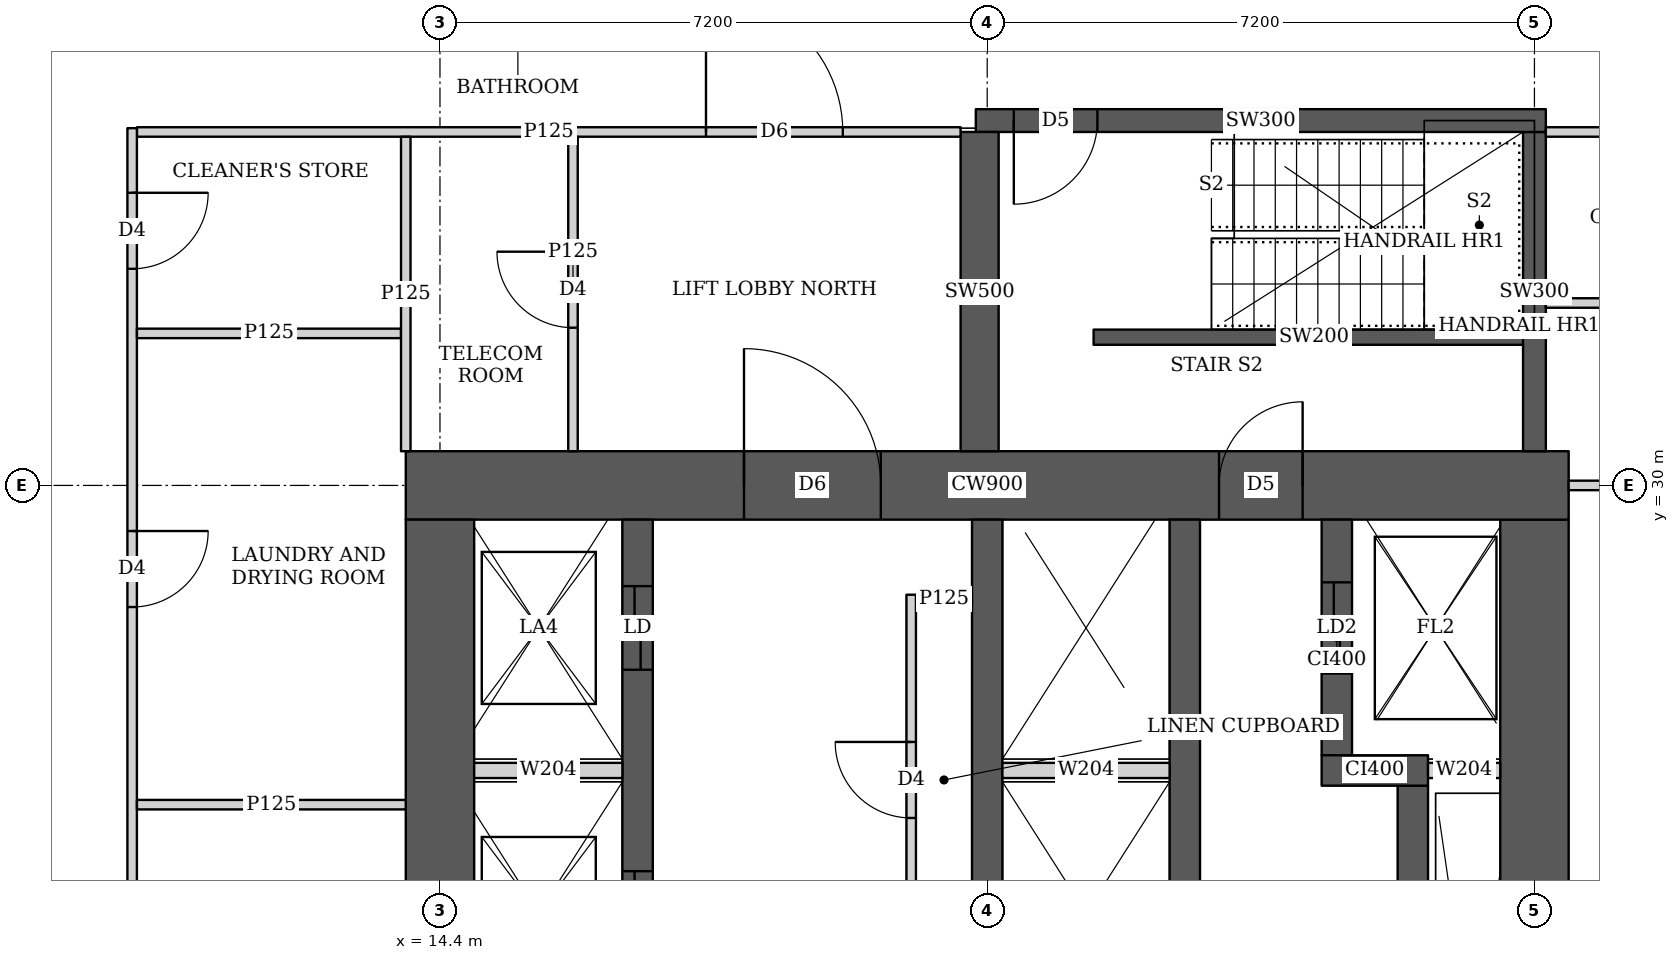
"""IFC4 building model, lengths in metres.
Left out: names, types, materials, properties, quantities, classifications, styles, units other than length and angle.
Written with IfcOpenShell. Run it as: python <this file> out.ifc"""

import sys

from ifc_helpers import new_model, si_unit, direction, frame, frame_2d, origin, place, context, subcontext, project, spatial, rectangle, extrude, element, fill, save


model = new_model("IFC4")
c1 = context("Model", 3, precision=1e-05, world=origin(), true_north=direction((0.0, 1.0)))
c2 = subcontext(c1, "Body", "Model", "MODEL_VIEW")
j1 = project(units=[si_unit("LENGTHUNIT", "METRE"), si_unit("PLANEANGLEUNIT", "RADIAN")], contexts=[c1])
p1 = place(None, origin())
s1 = spatial("IfcSite", under=j1, at=p1, CompositionType="ELEMENT")
p2 = place(p1, origin())
s2 = spatial("IfcBuilding", under=s1, at=p2, CompositionType="ELEMENT")
p3 = place(p2, frame((0.0, 0.0, 111.65)))
s3 = spatial("IfcBuildingStorey", under=s2, at=p3, CompositionType="ELEMENT", Elevation=111.65)
p4 = place(p3, frame((13.95, 30.0, 0.0), z_axis=(0.0, 0.0, 1.0), x_axis=(1.0, 0.0, 0.0)))
e1 = element("IfcWall", 1, at=p4, inside=s3, PredefinedType="SHEAR", context=c2, shape_type="SweptSolid", body=[
    extrude(rectangle(XDim=15.3, YDim=0.9, at=frame_2d((7.65, 0.0))), origin(), (0.0, 0.0, 1.0), 3.75),
])
p5 = place(p4, frame((4.45, 0.0, 0.0)))
e2 = element("IfcOpeningElement", 2, at=p5, cuts=e1, PredefinedType="OPENING", context=c2, shape_type="SweptSolid", body=[
    extrude(rectangle(XDim=1.8, YDim=2.1, at=frame_2d((0.9, 1.05))), frame((0.0, 0.46, 0.0), z_axis=(0.0, -1.0, 0.0), x_axis=(1.0, 0.0, 0.0)), (0.0, 0.0, 1.0), 0.92),
])
p6 = place(p4, frame((10.7, 0.0, 0.0)))
e3 = element("IfcOpeningElement", 3, at=p6, cuts=e1, PredefinedType="OPENING", context=c2, shape_type="SweptSolid", body=[
    extrude(rectangle(XDim=1.1, YDim=2.1, at=frame_2d((0.55, 1.05))), frame((0.0, 0.46, 0.0), z_axis=(0.0, -1.0, 0.0), x_axis=(1.0, 0.0, 0.0)), (0.0, 0.0, 1.0), 0.92),
])
for number, where, z_axis, x_axis in (
    (4, (14.4, 15.45, 0.0), (0.0, 0.0, 1.0), (0.0, 1.0, 0.0)),
    (5, (28.8, 15.45, 0.0), (0.0, 0.0, 1.0), (0.0, 1.0, 0.0)),
):
    element("IfcWall", number, at=place(p3, frame(where, z_axis=z_axis, x_axis=x_axis)), inside=s3, PredefinedType="SHEAR", context=c2, shape_type="SweptSolid", body=[
        extrude(rectangle(XDim=14.1, YDim=0.9, at=frame_2d((7.05, 0.0))), origin(), (0.0, 0.0, 1.0), 3.75),
    ])
p7 = place(p3, frame((17.0, 15.45, 0.0), z_axis=(0.0, 0.0, 1.0), x_axis=(0.0, 1.0, 0.0)))
e6 = element("IfcWall", 6, at=p7, inside=s3, PredefinedType="SHEAR", context=c2, shape_type="SweptSolid", body=[
    extrude(rectangle(XDim=14.1, YDim=0.4, at=frame_2d((7.05, 0.0))), origin(), (0.0, 0.0, 1.0), 3.75),
])
p8 = place(p7, frame((0.875, 0.0, 0.0)))
e7 = element("IfcOpeningElement", 7, at=p8, cuts=e6, PredefinedType="OPENING", context=c2, shape_type="SweptSolid", body=[
    extrude(rectangle(XDim=1.1, YDim=2.1, at=frame_2d((0.55, 1.05))), frame((0.0, 0.21, 0.0), z_axis=(0.0, -1.0, 0.0), x_axis=(1.0, 0.0, 0.0)), (0.0, 0.0, 1.0), 0.42),
])
p9 = place(p7, frame((4.625, 0.0, 0.0)))
e8 = element("IfcOpeningElement", 8, at=p9, cuts=e6, PredefinedType="OPENING", context=c2, shape_type="SweptSolid", body=[
    extrude(rectangle(XDim=1.1, YDim=2.1, at=frame_2d((0.55, 1.05))), frame((0.0, 0.21, 0.0), z_axis=(0.0, -1.0, 0.0), x_axis=(1.0, 0.0, 0.0)), (0.0, 0.0, 1.0), 0.42),
])
p10 = place(p7, frame((8.375, 0.0, 0.0)))
e9 = element("IfcOpeningElement", 9, at=p10, cuts=e6, PredefinedType="OPENING", context=c2, shape_type="SweptSolid", body=[
    extrude(rectangle(XDim=1.1, YDim=2.1, at=frame_2d((0.55, 1.05))), frame((0.0, 0.21, 0.0), z_axis=(0.0, -1.0, 0.0), x_axis=(1.0, 0.0, 0.0)), (0.0, 0.0, 1.0), 0.42),
])
p11 = place(p7, frame((12.125, 0.0, 0.0)))
e10 = element("IfcOpeningElement", 10, at=p11, cuts=e6, PredefinedType="OPENING", context=c2, shape_type="SweptSolid", body=[
    extrude(rectangle(XDim=1.1, YDim=2.1, at=frame_2d((0.55, 1.05))), frame((0.0, 0.21, 0.0), z_axis=(0.0, -1.0, 0.0), x_axis=(1.0, 0.0, 0.0)), (0.0, 0.0, 1.0), 0.42),
])
for number, where, z_axis, x_axis in (
    (11, (21.6, 15.45, 0.0), (0.0, 0.0, 1.0), (0.0, 1.0, 0.0)),
    (12, (24.2, 15.45, 0.0), (0.0, 0.0, 1.0), (0.0, 1.0, 0.0)),
):
    element("IfcWall", number, at=place(p3, frame(where, z_axis=z_axis, x_axis=x_axis)), inside=s3, PredefinedType="SHEAR", context=c2, shape_type="SweptSolid", body=[
        extrude(rectangle(XDim=14.1, YDim=0.4, at=frame_2d((7.05, 0.0))), origin(), (0.0, 0.0, 1.0), 3.75),
    ])
p12 = place(p3, frame((27.2, 18.95, 0.0), z_axis=(0.0, 0.0, 1.0), x_axis=(0.0, 1.0, 0.0)))
e13 = element("IfcWall", 13, at=p12, inside=s3, PredefinedType="SHEAR", context=c2, shape_type="SweptSolid", body=[
    extrude(rectangle(XDim=7.1, YDim=0.4, at=frame_2d((3.55, 0.0))), origin(), (0.0, 0.0, 1.0), 3.75),
])
p13 = place(p3, frame((26.0, 26.25, 0.0), z_axis=(0.0, 0.0, 1.0), x_axis=(1.0, 0.0, 0.0)))
e14 = element("IfcWall", 14, at=p13, inside=s3, PredefinedType="SHEAR", context=c2, shape_type="SweptSolid", body=[
    extrude(rectangle(XDim=1.4, YDim=0.4, at=frame_2d((0.7, 0.0))), origin(), (0.0, 0.0, 1.0), 3.75),
])
p14 = place(p3, frame((26.2, 26.45, 0.0), z_axis=(0.0, 0.0, 1.0), x_axis=(0.0, 1.0, 0.0)))
e15 = element("IfcWall", 15, at=p14, inside=s3, PredefinedType="SHEAR", context=c2, shape_type="SweptSolid", body=[
    extrude(rectangle(XDim=3.1, YDim=0.4, at=frame_2d((1.55, 0.0))), origin(), (0.0, 0.0, 1.0), 3.75),
])
p15 = place(p14, frame((1.075, 0.0, 0.0)))
e16 = element("IfcOpeningElement", 16, at=p15, cuts=e15, PredefinedType="OPENING", context=c2, shape_type="SweptSolid", body=[
    extrude(rectangle(XDim=1.2, YDim=2.1, at=frame_2d((0.6, 1.05))), frame((0.0, 0.21, 0.0), z_axis=(0.0, -1.0, 0.0), x_axis=(1.0, 0.0, 0.0)), (0.0, 0.0, 1.0), 0.42),
])
p16 = place(p3, frame((21.45, 34.8, 0.0), z_axis=(0.0, 0.0, 1.0), x_axis=(1.0, 0.0, 0.0)))
e17 = element("IfcWall", 17, at=p16, inside=s3, PredefinedType="SHEAR", context=c2, shape_type="SweptSolid", body=[
    extrude(rectangle(XDim=7.5, YDim=0.3, at=frame_2d((3.75, 0.0))), origin(), (0.0, 0.0, 1.0), 3.75),
])
p17 = place(p16, frame((0.5, 0.0, 0.0)))
e18 = element("IfcOpeningElement", 18, at=p17, cuts=e17, PredefinedType="OPENING", context=c2, shape_type="SweptSolid", body=[
    extrude(rectangle(XDim=1.1, YDim=2.1, at=frame_2d((0.55, 1.05))), frame((0.0, 0.16, 0.0), z_axis=(0.0, -1.0, 0.0), x_axis=(1.0, 0.0, 0.0)), (0.0, 0.0, 1.0), 0.32),
])
p18 = place(p3, frame((21.5, 30.45, 0.0), z_axis=(0.0, 0.0, 1.0), x_axis=(0.0, 1.0, 0.0)))
e19 = element("IfcWall", 19, at=p18, inside=s3, PredefinedType="SHEAR", context=c2, shape_type="SweptSolid", body=[
    extrude(rectangle(XDim=4.2, YDim=0.5, at=frame_2d((2.1, 0.0))), origin(), (0.0, 0.0, 1.0), 3.75),
])
p19 = place(p3, frame((28.8, 30.45, 0.0), z_axis=(0.0, 0.0, 1.0), x_axis=(0.0, 1.0, 0.0)))
e20 = element("IfcWall", 20, at=p19, inside=s3, PredefinedType="SHEAR", context=c2, shape_type="SweptSolid", body=[
    extrude(rectangle(XDim=4.2, YDim=0.3, at=frame_2d((2.1, 0.0))), origin(), (0.0, 0.0, 1.0), 3.75),
])
p20 = place(p3, frame((10.35, 10.3, 0.0), z_axis=(0.0, 0.0, 1.0), x_axis=(0.0, 1.0, 0.0)))
e21 = element("IfcWall", 21, at=p20, inside=s3, PredefinedType="PARTITIONING", context=c2, shape_type="SweptSolid", body=[
    extrude(rectangle(XDim=24.4, YDim=0.125, at=frame_2d((12.2, 0.0))), origin(), (0.0, 0.0, 1.0), 3.5),
])
p21 = place(p20, frame((1.55, 0.0, 0.0)))
e22 = element("IfcOpeningElement", 22, at=p21, cuts=e21, PredefinedType="OPENING", context=c2, shape_type="SweptSolid", body=[
    extrude(rectangle(XDim=1.0, YDim=2.1, at=frame_2d((0.5, 1.05))), frame((0.0, 0.073, 0.0), z_axis=(0.0, -1.0, 0.0), x_axis=(1.0, 0.0, 0.0)), (0.0, 0.0, 1.0), 0.145),
])
p22 = place(p20, frame((5.1, 0.0, 0.0)))
e23 = element("IfcOpeningElement", 23, at=p22, cuts=e21, PredefinedType="OPENING", context=c2, shape_type="SweptSolid", body=[
    extrude(rectangle(XDim=1.0, YDim=2.1, at=frame_2d((0.5, 1.05))), frame((0.0, 0.073, 0.0), z_axis=(0.0, -1.0, 0.0), x_axis=(1.0, 0.0, 0.0)), (0.0, 0.0, 1.0), 0.145),
])
p23 = place(p20, frame((10.8, 0.0, 0.0)))
e24 = element("IfcOpeningElement", 24, at=p23, cuts=e21, PredefinedType="OPENING", context=c2, shape_type="SweptSolid", body=[
    extrude(rectangle(XDim=1.0, YDim=2.1, at=frame_2d((0.5, 1.05))), frame((0.0, 0.073, 0.0), z_axis=(0.0, -1.0, 0.0), x_axis=(1.0, 0.0, 0.0)), (0.0, 0.0, 1.0), 0.145),
])
p24 = place(p20, frame((18.1, 0.0, 0.0)))
e25 = element("IfcOpeningElement", 25, at=p24, cuts=e21, PredefinedType="OPENING", context=c2, shape_type="SweptSolid", body=[
    extrude(rectangle(XDim=1.0, YDim=2.1, at=frame_2d((0.5, 1.05))), frame((0.0, 0.073, 0.0), z_axis=(0.0, -1.0, 0.0), x_axis=(1.0, 0.0, 0.0)), (0.0, 0.0, 1.0), 0.145),
])
p25 = place(p20, frame((22.55, 0.0, 0.0)))
e26 = element("IfcOpeningElement", 26, at=p25, cuts=e21, PredefinedType="OPENING", context=c2, shape_type="SweptSolid", body=[
    extrude(rectangle(XDim=1.0, YDim=2.1, at=frame_2d((0.5, 1.05))), frame((0.0, 0.073, 0.0), z_axis=(0.0, -1.0, 0.0), x_axis=(1.0, 0.0, 0.0)), (0.0, 0.0, 1.0), 0.145),
])
p26 = place(p3, frame((10.413, 25.8, 0.0), z_axis=(0.0, 0.0, 1.0), x_axis=(1.0, 0.0, 0.0)))
e27 = element("IfcWall", 27, at=p26, inside=s3, PredefinedType="PARTITIONING", context=c2, shape_type="SweptSolid", body=[
    extrude(rectangle(XDim=3.537, YDim=0.125, at=frame_2d((1.769, 0.0))), origin(), (0.0, 0.0, 1.0), 3.5),
])
p27 = place(p3, frame((10.413, 32.0, 0.0), z_axis=(0.0, 0.0, 1.0), x_axis=(1.0, 0.0, 0.0)))
e28 = element("IfcWall", 28, at=p27, inside=s3, PredefinedType="PARTITIONING", context=c2, shape_type="SweptSolid", body=[
    extrude(rectangle(XDim=3.475, YDim=0.125, at=frame_2d((1.737, 0.0))), origin(), (0.0, 0.0, 1.0), 3.5),
])
p28 = place(p3, frame((13.95, 30.45, 0.0), z_axis=(0.0, 0.0, 1.0), x_axis=(0.0, 1.0, 0.0)))
e29 = element("IfcWall", 29, at=p28, inside=s3, PredefinedType="PARTITIONING", context=c2, shape_type="SweptSolid", body=[
    extrude(rectangle(XDim=4.137, YDim=0.125, at=frame_2d((2.068, 0.0))), origin(), (0.0, 0.0, 1.0), 3.5),
])
p29 = place(p3, frame((10.413, 34.65, 0.0), z_axis=(0.0, 0.0, 1.0), x_axis=(1.0, 0.0, 0.0)))
e30 = element("IfcWall", 30, at=p29, inside=s3, PredefinedType="PARTITIONING", context=c2, shape_type="SweptSolid", body=[
    extrude(rectangle(XDim=10.837, YDim=0.125, at=frame_2d((5.418, 0.0))), origin(), (0.0, 0.0, 1.0), 3.5),
])
p30 = place(p29, frame((7.487, 0.0, 0.0)))
e31 = element("IfcOpeningElement", 31, at=p30, cuts=e30, PredefinedType="OPENING", context=c2, shape_type="SweptSolid", body=[
    extrude(rectangle(XDim=1.8, YDim=2.1, at=frame_2d((0.9, 1.05))), frame((0.0, 0.073, 0.0), z_axis=(0.0, -1.0, 0.0), x_axis=(1.0, 0.0, 0.0)), (0.0, 0.0, 1.0), 0.145),
])
p31 = place(p3, frame((16.15, 30.45, 0.0), z_axis=(0.0, 0.0, 1.0), x_axis=(0.0, 1.0, 0.0)))
e32 = element("IfcWall", 32, at=p31, inside=s3, PredefinedType="PARTITIONING", context=c2, shape_type="SweptSolid", body=[
    extrude(rectangle(XDim=4.137, YDim=0.125, at=frame_2d((2.068, 0.0))), origin(), (0.0, 0.0, 1.0), 3.5),
])
p32 = place(p31, frame((1.625, 0.0, 0.0)))
e33 = element("IfcOpeningElement", 33, at=p32, cuts=e32, PredefinedType="OPENING", context=c2, shape_type="SweptSolid", body=[
    extrude(rectangle(XDim=1.0, YDim=2.1, at=frame_2d((0.5, 1.05))), frame((0.0, 0.073, 0.0), z_axis=(0.0, -1.0, 0.0), x_axis=(1.0, 0.0, 0.0)), (0.0, 0.0, 1.0), 0.145),
])
p33 = place(p3, frame((28.95, 34.65, 0.0), z_axis=(0.0, 0.0, 1.0), x_axis=(1.0, 0.0, 0.0)))
e34 = element("IfcWall", 34, at=p33, inside=s3, PredefinedType="PARTITIONING", context=c2, shape_type="SweptSolid", body=[
    extrude(rectangle(XDim=4.381, YDim=0.125, at=frame_2d((2.19, 0.0))), origin(), (0.0, 0.0, 1.0), 3.5),
])
p34 = place(p3, frame((29.25, 30.0, 0.0), z_axis=(0.0, 0.0, 1.0), x_axis=(1.0, 0.0, 0.0)))
e35 = element("IfcWall", 35, at=p34, inside=s3, PredefinedType="PARTITIONING", context=c2, shape_type="SweptSolid", body=[
    extrude(rectangle(XDim=2.949, YDim=0.125, at=frame_2d((1.475, 0.0))), origin(), (0.0, 0.0, 1.0), 3.5),
])
p35 = place(p3, frame((28.95, 32.4, 0.0), z_axis=(0.0, 0.0, 1.0), x_axis=(1.0, 0.0, 0.0)))
e36 = element("IfcWall", 36, at=p35, inside=s3, PredefinedType="PARTITIONING", context=c2, shape_type="SweptSolid", body=[
    extrude(rectangle(XDim=4.722, YDim=0.125, at=frame_2d((2.361, 0.0))), origin(), (0.0, 0.0, 1.0), 3.5),
])
p36 = place(p3, frame((20.6, 19.938, 0.0), z_axis=(0.0, 0.0, 1.0), x_axis=(0.0, 1.0, 0.0)))
e37 = element("IfcWall", 37, at=p36, inside=s3, PredefinedType="PARTITIONING", context=c2, shape_type="SweptSolid", body=[
    extrude(rectangle(XDim=8.624, YDim=0.125, at=frame_2d((4.312, 0.0))), origin(), (0.0, 0.0, 1.0), 3.5),
])
p37 = place(p36, frame((1.437, 0.0, 0.0)))
e38 = element("IfcOpeningElement", 38, at=p37, cuts=e37, PredefinedType="OPENING", context=c2, shape_type="SweptSolid", body=[
    extrude(rectangle(XDim=1.0, YDim=2.1, at=frame_2d((0.5, 1.05))), frame((0.0, 0.073, 0.0), z_axis=(0.0, -1.0, 0.0), x_axis=(1.0, 0.0, 0.0)), (0.0, 0.0, 1.0), 0.145),
])
p38 = place(p36, frame((5.687, 0.0, 0.0)))
e39 = element("IfcOpeningElement", 39, at=p38, cuts=e37, PredefinedType="OPENING", context=c2, shape_type="SweptSolid", body=[
    extrude(rectangle(XDim=1.0, YDim=2.1, at=frame_2d((0.5, 1.05))), frame((0.0, 0.073, 0.0), z_axis=(0.0, -1.0, 0.0), x_axis=(1.0, 0.0, 0.0)), (0.0, 0.0, 1.0), 0.145),
])
p39 = place(p3, frame((20.663, 28.5, 0.0), z_axis=(0.0, 0.0, 1.0), x_axis=(1.0, 0.0, 0.0)))
e40 = element("IfcWall", 40, at=p39, inside=s3, PredefinedType="PARTITIONING", context=c2, shape_type="SweptSolid", body=[
    extrude(rectangle(XDim=0.737, YDim=0.125, at=frame_2d((0.368, 0.0))), origin(), (0.0, 0.0, 1.0), 3.5),
])
p40 = place(p3, frame((23.0, 31.95, 0.0), z_axis=(0.0, 0.0, 1.0), x_axis=(1.0, 0.0, 0.0)))
e41 = element("IfcWall", 41, at=p40, inside=s3, PredefinedType="SHEAR", context=c2, shape_type="SweptSolid", body=[
    extrude(rectangle(XDim=5.8, YDim=0.2, at=frame_2d((2.9, 0.0))), origin(), (0.0, 0.0, 1.0), 3.75),
])
p41 = place(p3, frame((14.85, 26.25, 0.0), z_axis=(0.0, 0.0, 1.0), x_axis=(1.0, 0.0, 0.0)))
e42 = element("IfcWall", 42, at=p41, inside=s3, PredefinedType="SOLIDWALL", context=c2, shape_type="SweptSolid", body=[
    extrude(rectangle(XDim=1.95, YDim=0.2, at=frame_2d((0.975, 0.0))), origin(), (0.0, 0.0, 1.0), 3.5),
])
p42 = place(p3, frame((21.8, 26.25, 0.0), z_axis=(0.0, 0.0, 1.0), x_axis=(1.0, 0.0, 0.0)))
e43 = element("IfcWall", 43, at=p42, inside=s3, PredefinedType="SOLIDWALL", context=c2, shape_type="SweptSolid", body=[
    extrude(rectangle(XDim=2.2, YDim=0.2, at=frame_2d((1.1, 0.0))), origin(), (0.0, 0.0, 1.0), 3.5),
])
p43 = place(p3, frame((27.4, 26.25, 0.0), z_axis=(0.0, 0.0, 1.0), x_axis=(1.0, 0.0, 0.0)))
e44 = element("IfcWall", 44, at=p43, inside=s3, PredefinedType="SOLIDWALL", context=c2, shape_type="SweptSolid", body=[
    extrude(rectangle(XDim=0.95, YDim=0.2, at=frame_2d((0.475, 0.0))), origin(), (0.0, 0.0, 1.0), 3.5),
])
p44 = place(p24, origin())
e45 = element("IfcDoor", 45, at=p44, inside=s3, OperationType="SINGLE_SWING_LEFT", PredefinedType="DOOR", context=c2, shape_type="SweptSolid", body=[
    extrude(rectangle(XDim=1.0, YDim=2.1, at=frame_2d((0.5, 1.05))), frame((0.0, 0.025, 0.0), z_axis=(0.0, -1.0, 0.0), x_axis=(1.0, 0.0, 0.0)), (0.0, 0.0, 1.0), 0.05),
])
fill(e25, e45)
p45 = place(p25, origin())
e46 = element("IfcDoor", 46, at=p45, inside=s3, OperationType="SINGLE_SWING_LEFT", PredefinedType="DOOR", context=c2, shape_type="SweptSolid", body=[
    extrude(rectangle(XDim=1.0, YDim=2.1, at=frame_2d((0.5, 1.05))), frame((0.0, 0.025, 0.0), z_axis=(0.0, -1.0, 0.0), x_axis=(1.0, 0.0, 0.0)), (0.0, 0.0, 1.0), 0.05),
])
fill(e26, e46)
p46 = place(p32, origin())
e47 = element("IfcDoor", 47, at=p46, inside=s3, OperationType="SINGLE_SWING_RIGHT", PredefinedType="DOOR", context=c2, shape_type="SweptSolid", body=[
    extrude(rectangle(XDim=1.0, YDim=2.1, at=frame_2d((0.5, 1.05))), frame((0.0, 0.025, 0.0), z_axis=(0.0, -1.0, 0.0), x_axis=(1.0, 0.0, 0.0)), (0.0, 0.0, 1.0), 0.05),
])
fill(e33, e47)
p47 = place(p30, origin())
e48 = element("IfcDoor", 48, at=p47, inside=s3, OperationType="DOUBLE_DOOR_SINGLE_SWING", PredefinedType="DOOR", context=c2, shape_type="SweptSolid", body=[
    extrude(rectangle(XDim=1.8, YDim=2.1, at=frame_2d((0.9, 1.05))), frame((0.0, 0.025, 0.0), z_axis=(0.0, -1.0, 0.0), x_axis=(1.0, 0.0, 0.0)), (0.0, 0.0, 1.0), 0.05),
])
fill(e31, e48)
p48 = place(p38, origin())
e49 = element("IfcDoor", 49, at=p48, inside=s3, OperationType="SINGLE_SWING_RIGHT", PredefinedType="DOOR", context=c2, shape_type="SweptSolid", body=[
    extrude(rectangle(XDim=1.0, YDim=2.1, at=frame_2d((0.5, 1.05))), frame((0.0, 0.025, 0.0), z_axis=(0.0, -1.0, 0.0), x_axis=(1.0, 0.0, 0.0)), (0.0, 0.0, 1.0), 0.05),
])
fill(e39, e49)
p49 = place(p5, origin())
e50 = element("IfcDoor", 50, at=p49, inside=s3, OperationType="DOUBLE_DOOR_SINGLE_SWING", PredefinedType="DOOR", context=c2, shape_type="SweptSolid", body=[
    extrude(rectangle(XDim=1.8, YDim=2.1, at=frame_2d((0.9, 1.05))), frame((0.0, 0.025, 0.0), z_axis=(0.0, -1.0, 0.0), x_axis=(1.0, 0.0, 0.0)), (0.0, 0.0, 1.0), 0.05),
])
fill(e2, e50)
p50 = place(p6, origin())
e51 = element("IfcDoor", 51, at=p50, inside=s3, OperationType="SINGLE_SWING_RIGHT", PredefinedType="DOOR", context=c2, shape_type="SweptSolid", body=[
    extrude(rectangle(XDim=1.1, YDim=2.1, at=frame_2d((0.55, 1.05))), frame((0.0, 0.025, 0.0), z_axis=(0.0, -1.0, 0.0), x_axis=(1.0, 0.0, 0.0)), (0.0, 0.0, 1.0), 0.05),
])
fill(e3, e51)
p51 = place(p15, origin())
e52 = element("IfcDoor", 52, at=p51, inside=s3, OperationType="DOUBLE_DOOR_SLIDING", PredefinedType="DOOR", context=c2, shape_type="SweptSolid", body=[
    extrude(rectangle(XDim=1.2, YDim=2.1, at=frame_2d((0.6, 1.05))), frame((0.0, 0.025, 0.0), z_axis=(0.0, -1.0, 0.0), x_axis=(1.0, 0.0, 0.0)), (0.0, 0.0, 1.0), 0.05),
])
fill(e16, e52)
p52 = place(p10, origin())
e53 = element("IfcDoor", 53, at=p52, inside=s3, OperationType="DOUBLE_DOOR_SLIDING", PredefinedType="DOOR", context=c2, shape_type="SweptSolid", body=[
    extrude(rectangle(XDim=1.1, YDim=2.1, at=frame_2d((0.55, 1.05))), frame((0.0, 0.025, 0.0), z_axis=(0.0, -1.0, 0.0), x_axis=(1.0, 0.0, 0.0)), (0.0, 0.0, 1.0), 0.05),
])
fill(e9, e53)
p53 = place(p11, origin())
e54 = element("IfcDoor", 54, at=p53, inside=s3, OperationType="DOUBLE_DOOR_SLIDING", PredefinedType="DOOR", context=c2, shape_type="SweptSolid", body=[
    extrude(rectangle(XDim=1.1, YDim=2.1, at=frame_2d((0.55, 1.05))), frame((0.0, 0.025, 0.0), z_axis=(0.0, -1.0, 0.0), x_axis=(1.0, 0.0, 0.0)), (0.0, 0.0, 1.0), 0.05),
])
fill(e10, e54)
p54 = place(p17, origin())
e55 = element("IfcDoor", 55, at=p54, inside=s3, OperationType="SINGLE_SWING_RIGHT", PredefinedType="DOOR", context=c2, shape_type="SweptSolid", body=[
    extrude(rectangle(XDim=1.1, YDim=2.1, at=frame_2d((0.55, 1.05))), frame((0.0, 0.025, 0.0), z_axis=(0.0, -1.0, 0.0), x_axis=(1.0, 0.0, 0.0)), (0.0, 0.0, 1.0), 0.05),
])
fill(e18, e55)
save(model, sys.argv[1])
